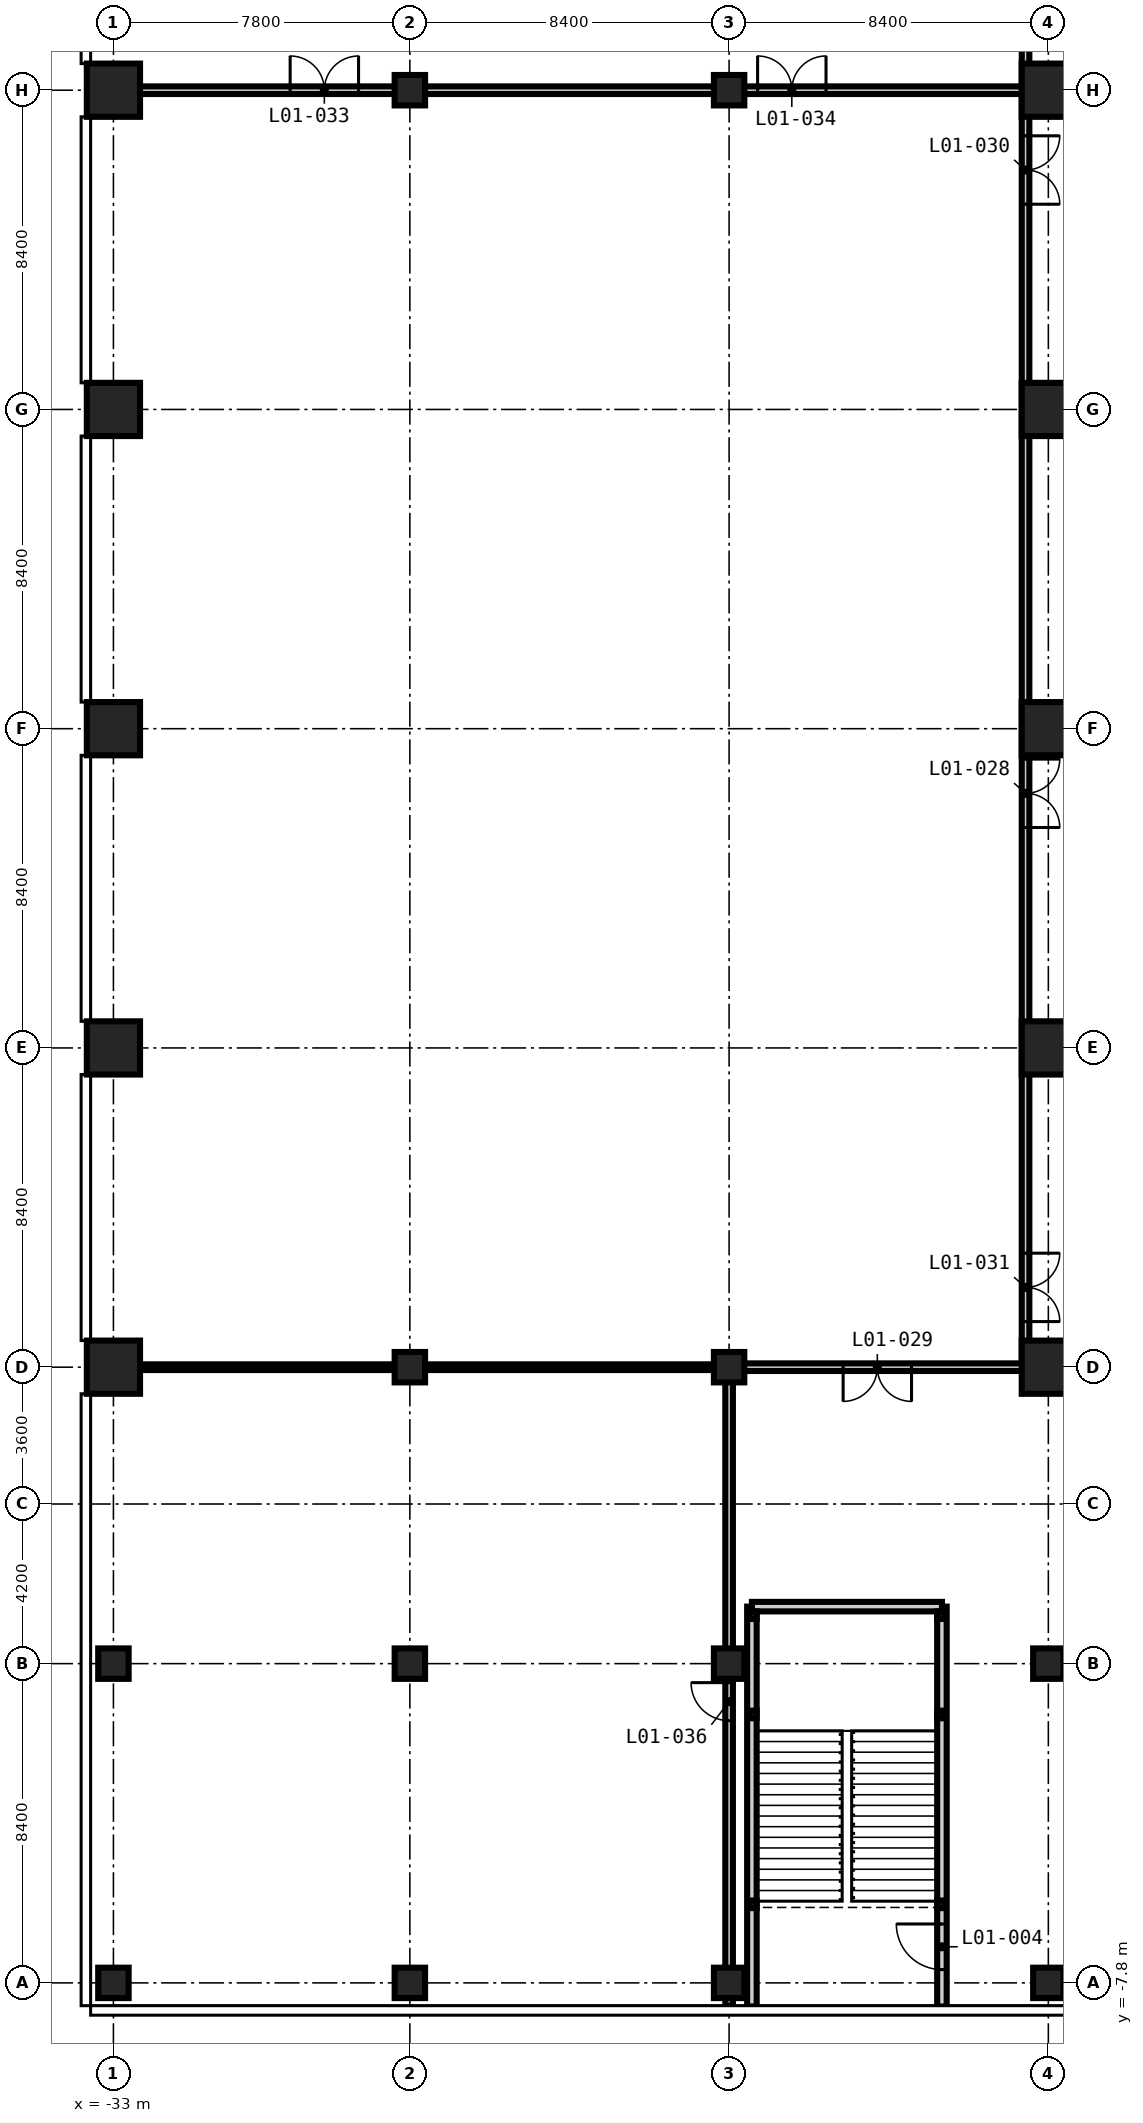
"""IFC4 building model, lengths in metres.
Left out: names, types, materials, properties, quantities, classifications, styles, units other than length and angle.
Written with IfcOpenShell. Run it as: python <this file> out.ifc"""

import sys

from ifc_helpers import new_model, si_unit, direction, frame, frame_2d, origin, origin_2d, place, context, subcontext, project, spatial, rectangle, hollow_rectangle, extrude, element, fill, save


model = new_model("IFC4")
c1 = context("Model", 3, precision=1e-05, world=origin(), true_north=direction((0.0, 1.0)))
c2 = subcontext(c1, "Body", "Model", "MODEL_VIEW")
j1 = project(units=[si_unit("LENGTHUNIT", "METRE"), si_unit("PLANEANGLEUNIT", "RADIAN")], contexts=[c1])
p1 = place(None, origin())
s1 = spatial("IfcSite", under=j1, at=p1, CompositionType="ELEMENT")
p2 = place(p1, origin())
s2 = spatial("IfcBuilding", under=s1, at=p2, CompositionType="ELEMENT")
p3 = place(p2, frame((0.0, 0.0, 6.0)))
s3 = spatial("IfcBuildingStorey", under=s2, at=p3, CompositionType="ELEMENT", Elevation=6.0)
for number, where, z_axis, x_axis in (
    (1, (-33.0, -7.8, -0.3), (0.0, 0.0, 1.0), (1.0, 0.0, 0.0)),
    (2, (-33.0, 0.6, -0.3), (0.0, 0.0, 1.0), (1.0, 0.0, 0.0)),
):
    element("IfcColumn", number, at=place(p3, frame(where, z_axis=z_axis, x_axis=x_axis)), inside=s3, PredefinedType="COLUMN", context=c2, shape_type="SweptSolid", body=[
        extrude(rectangle(XDim=0.8, YDim=0.8, at=origin_2d()), origin(), (0.0, 0.0, 1.0), 6.0),
    ])
for number, where, z_axis, x_axis in (
    (3, (-33.0, 8.4, -0.3), (0.0, 0.0, 1.0), (1.0, 0.0, 0.0)),
    (4, (-33.0, 16.8, -0.3), (0.0, 0.0, 1.0), (1.0, 0.0, 0.0)),
    (5, (-33.0, 25.2, -0.3), (0.0, 0.0, 1.0), (1.0, 0.0, 0.0)),
    (6, (-33.0, 33.6, -0.3), (0.0, 0.0, 1.0), (1.0, 0.0, 0.0)),
    (7, (-33.0, 42.0, -0.3), (0.0, 0.0, 1.0), (1.0, 0.0, 0.0)),
):
    element("IfcColumn", number, at=place(p3, frame(where, z_axis=z_axis, x_axis=x_axis)), inside=s3, PredefinedType="COLUMN", context=c2, shape_type="SweptSolid", body=[
        extrude(rectangle(XDim=1.4, YDim=1.4, at=origin_2d()), origin(), (0.0, 0.0, 1.0), 6.0),
    ])
for number, where, z_axis, x_axis in (
    (8, (-25.2, -7.8, -0.3), (0.0, 0.0, 1.0), (1.0, 0.0, 0.0)),
    (9, (-25.2, 0.6, -0.3), (0.0, 0.0, 1.0), (1.0, 0.0, 0.0)),
    (10, (-25.2, 8.4, -0.3), (0.0, 0.0, 1.0), (1.0, 0.0, 0.0)),
    (11, (-25.2, 42.0, -0.3), (0.0, 0.0, 1.0), (1.0, 0.0, 0.0)),
    (12, (-16.8, -7.8, -0.3), (0.0, 0.0, 1.0), (1.0, 0.0, 0.0)),
    (13, (-16.8, 0.6, -0.3), (0.0, 0.0, 1.0), (1.0, 0.0, 0.0)),
    (14, (-16.8, 8.4, -0.3), (0.0, 0.0, 1.0), (1.0, 0.0, 0.0)),
    (15, (-16.8, 42.0, -0.3), (0.0, 0.0, 1.0), (1.0, 0.0, 0.0)),
    (16, (-8.4, -7.8, -0.3), (0.0, 0.0, 1.0), (1.0, 0.0, 0.0)),
    (17, (-8.4, 0.6, -0.3), (0.0, 0.0, 1.0), (1.0, 0.0, 0.0)),
):
    element("IfcColumn", number, at=place(p3, frame(where, z_axis=z_axis, x_axis=x_axis)), inside=s3, PredefinedType="COLUMN", context=c2, shape_type="SweptSolid", body=[
        extrude(rectangle(XDim=0.8, YDim=0.8, at=origin_2d()), origin(), (0.0, 0.0, 1.0), 6.0),
    ])
for number, where, z_axis, x_axis in (
    (18, (-8.4, 8.4, -0.3), (0.0, 0.0, 1.0), (1.0, 0.0, 0.0)),
    (19, (-8.4, 16.8, -0.3), (0.0, 0.0, 1.0), (1.0, 0.0, 0.0)),
    (20, (-8.4, 25.2, -0.3), (0.0, 0.0, 1.0), (1.0, 0.0, 0.0)),
    (21, (-8.4, 33.6, -0.3), (0.0, 0.0, 1.0), (1.0, 0.0, 0.0)),
    (22, (-8.4, 42.0, -0.3), (0.0, 0.0, 1.0), (1.0, 0.0, 0.0)),
):
    element("IfcColumn", number, at=place(p3, frame(where, z_axis=z_axis, x_axis=x_axis)), inside=s3, PredefinedType="COLUMN", context=c2, shape_type="SweptSolid", body=[
        extrude(rectangle(XDim=1.4, YDim=1.4, at=origin_2d()), origin(), (0.0, 0.0, 1.0), 6.0),
    ])
p4 = place(p3, frame((-16.8, -8.4, 0.0), z_axis=(0.0, 0.0, 1.0), x_axis=(0.0, 1.0, 0.0)))
e23 = element("IfcWall", 23, at=p4, inside=s3, PredefinedType="PARTITIONING", context=c2, shape_type="SweptSolid", body=[
    extrude(rectangle(XDim=16.8, YDim=0.2, at=frame_2d((8.4, 0.0))), origin(), (0.0, 0.0, 1.0), 5.7),
])
p5 = place(p4, frame((7.5, 0.0, 0.0)))
e24 = element("IfcOpeningElement", 24, at=p5, cuts=e23, PredefinedType="OPENING", context=c2, shape_type="SweptSolid", body=[
    extrude(rectangle(XDim=1.0, YDim=2.1, at=frame_2d((0.5, 1.05))), frame((0.0, 0.11, 0.0), z_axis=(0.0, -1.0, 0.0), x_axis=(1.0, 0.0, 0.0)), (0.0, 0.0, 1.0), 0.22),
])
p6 = place(p3, frame((-9.0, 42.0, 0.0), z_axis=(0.0, 0.0, 1.0), x_axis=(0.0, 1.0, 0.0)))
e25 = element("IfcWall", 25, at=p6, inside=s3, PredefinedType="PARTITIONING", context=c2, shape_type="SweptSolid", body=[
    extrude(rectangle(XDim=2.4, YDim=0.2, at=frame_2d((1.2, 0.0))), origin(), (0.0, 0.0, 1.0), 5.7),
])
p7 = place(p3, frame((-33.6, 42.0, 0.0), z_axis=(0.0, 0.0, 1.0), x_axis=(1.0, 0.0, 0.0)))
e26 = element("IfcWall", 26, at=p7, inside=s3, PredefinedType="PARTITIONING", context=c2, shape_type="SweptSolid", body=[
    extrude(rectangle(XDim=24.6, YDim=0.2, at=frame_2d((12.3, 0.0))), origin(), (0.0, 0.0, 1.0), 5.7),
])
p8 = place(p7, frame((5.25, 0.0, 0.0)))
e27 = element("IfcOpeningElement", 27, at=p8, cuts=e26, PredefinedType="OPENING", context=c2, shape_type="SweptSolid", body=[
    extrude(rectangle(XDim=1.8, YDim=2.4, at=frame_2d((0.9, 1.2))), frame((0.0, 0.11, 0.0), z_axis=(0.0, -1.0, 0.0), x_axis=(1.0, 0.0, 0.0)), (0.0, 0.0, 1.0), 0.22),
])
p9 = place(p7, frame((17.55, 0.0, 0.0)))
e28 = element("IfcOpeningElement", 28, at=p9, cuts=e26, PredefinedType="OPENING", context=c2, shape_type="SweptSolid", body=[
    extrude(rectangle(XDim=1.8, YDim=2.4, at=frame_2d((0.9, 1.2))), frame((0.0, 0.11, 0.0), z_axis=(0.0, -1.0, 0.0), x_axis=(1.0, 0.0, 0.0)), (0.0, 0.0, 1.0), 0.22),
])
p10 = place(p3, frame((-9.0, 42.0, 0.0), z_axis=(0.0, 0.0, 1.0), x_axis=(0.0, -1.0, 0.0)))
e29 = element("IfcWall", 29, at=p10, inside=s3, PredefinedType="PARTITIONING", context=c2, shape_type="SweptSolid", body=[
    extrude(rectangle(XDim=33.6, YDim=0.2, at=frame_2d((16.8, 0.0))), origin(), (0.0, 0.0, 1.0), 5.7),
])
p11 = place(p10, frame((17.6, 0.0, 0.0)))
e30 = element("IfcOpeningElement", 30, at=p11, cuts=e29, PredefinedType="OPENING", context=c2, shape_type="SweptSolid", body=[
    extrude(rectangle(XDim=1.8, YDim=2.4, at=frame_2d((0.9, 1.2))), frame((0.0, 0.11, 0.0), z_axis=(0.0, -1.0, 0.0), x_axis=(1.0, 0.0, 0.0)), (0.0, 0.0, 1.0), 0.22),
])
p12 = place(p10, frame((1.2, 0.0, 0.0)))
e31 = element("IfcOpeningElement", 31, at=p12, cuts=e29, PredefinedType="OPENING", context=c2, shape_type="SweptSolid", body=[
    extrude(rectangle(XDim=1.8, YDim=2.4, at=frame_2d((0.9, 1.2))), frame((0.0, 0.11, 0.0), z_axis=(0.0, -1.0, 0.0), x_axis=(1.0, 0.0, 0.0)), (0.0, 0.0, 1.0), 0.22),
])
p13 = place(p10, frame((30.6, 0.0, 0.0)))
e32 = element("IfcOpeningElement", 32, at=p13, cuts=e29, PredefinedType="OPENING", context=c2, shape_type="SweptSolid", body=[
    extrude(rectangle(XDim=1.8, YDim=2.4, at=frame_2d((0.9, 1.2))), frame((0.0, 0.11, 0.0), z_axis=(0.0, -1.0, 0.0), x_axis=(1.0, 0.0, 0.0)), (0.0, 0.0, 1.0), 0.22),
])
p14 = place(p3, frame((-9.0, 8.4, 0.0), z_axis=(0.0, 0.0, 1.0), x_axis=(-1.0, 0.0, 0.0)))
e33 = element("IfcWall", 33, at=p14, inside=s3, PredefinedType="PARTITIONING", context=c2, shape_type="SweptSolid", body=[
    extrude(rectangle(XDim=7.8, YDim=0.2, at=frame_2d((3.9, 0.0))), origin(), (0.0, 0.0, 1.0), 5.7),
])
p15 = place(p14, frame((3.0, 0.0, 0.0)))
e34 = element("IfcOpeningElement", 34, at=p15, cuts=e33, PredefinedType="OPENING", context=c2, shape_type="SweptSolid", body=[
    extrude(rectangle(XDim=1.8, YDim=2.4, at=frame_2d((0.9, 1.2))), frame((0.0, 0.11, 0.0), z_axis=(0.0, -1.0, 0.0), x_axis=(1.0, 0.0, 0.0)), (0.0, 0.0, 1.0), 0.22),
])
p16 = place(p3, frame((-33.6, 8.4, 0.0), z_axis=(0.0, 0.0, 1.0), x_axis=(1.0, 0.0, 0.0)))
e35 = element("IfcWall", 35, at=p16, inside=s3, PredefinedType="PARTITIONING", context=c2, shape_type="SweptSolid", body=[
    extrude(rectangle(XDim=16.8, YDim=0.15, at=frame_2d((8.4, 0.0))), origin(), (0.0, 0.0, 1.0), 5.7),
])
p17 = place(p3, frame((-16.2, -8.423, 0.0), z_axis=(0.0, 0.0, 1.0), x_axis=(0.0, 1.0, 0.0)))
e36 = element("IfcWall", 36, at=p17, inside=s3, PredefinedType="PARTITIONING", context=c2, shape_type="SweptSolid", body=[
    extrude(rectangle(XDim=10.523, YDim=0.25, at=frame_2d((5.262, 0.0))), origin(), (0.0, 0.0, 1.0), 5.7),
])
p18 = place(p3, frame((-11.2, -8.423, 0.0), z_axis=(0.0, 0.0, 1.0), x_axis=(0.0, 1.0, 0.0)))
e37 = element("IfcWall", 37, at=p18, inside=s3, PredefinedType="PARTITIONING", context=c2, shape_type="SweptSolid", body=[
    extrude(rectangle(XDim=10.523, YDim=0.25, at=frame_2d((5.262, 0.0))), origin(), (0.0, 0.0, 1.0), 5.7),
])
p19 = place(p18, frame((0.973, 0.0, 0.0)))
e38 = element("IfcOpeningElement", 38, at=p19, cuts=e37, PredefinedType="OPENING", context=c2, shape_type="SweptSolid", body=[
    extrude(rectangle(XDim=1.2, YDim=2.2, at=frame_2d((0.6, 1.1))), frame((0.0, 0.135, 0.0), z_axis=(0.0, -1.0, 0.0), x_axis=(1.0, 0.0, 0.0)), (0.0, 0.0, 1.0), 0.27),
])
p20 = place(p3, frame((-16.2, 2.1, 0.0), z_axis=(0.0, 0.0, 1.0), x_axis=(1.0, 0.0, 0.0)))
e39 = element("IfcWall", 39, at=p20, inside=s3, PredefinedType="PARTITIONING", context=c2, shape_type="SweptSolid", body=[
    extrude(rectangle(XDim=5.0, YDim=0.25, at=frame_2d((2.5, 0.0))), origin(), (0.0, 0.0, 1.0), 5.7),
])
for number, where, z_axis, x_axis in (
    (40, (-16.175, -5.732, -0.3), (0.0, 0.0, 1.0), (1.0, 0.0, 0.0)),
    (41, (-11.225, -5.732, -0.3), (0.0, 0.0, 1.0), (1.0, 0.0, 0.0)),
    (42, (-16.175, -0.738, -0.3), (0.0, 0.0, 1.0), (1.0, 0.0, 0.0)),
    (43, (-11.225, -0.738, -0.3), (0.0, 0.0, 1.0), (1.0, 0.0, 0.0)),
    (44, (-16.175, 1.875, -0.3), (0.0, 0.0, 1.0), (1.0, 0.0, 0.0)),
    (45, (-11.225, 1.875, -0.3), (0.0, 0.0, 1.0), (1.0, 0.0, 0.0)),
):
    element("IfcColumn", number, at=place(p3, frame(where, z_axis=z_axis, x_axis=x_axis)), inside=s3, PredefinedType="COLUMN", context=c2, shape_type="SweptSolid", body=[
        extrude(hollow_rectangle(XDim=0.2, YDim=0.2, WallThickness=0.01, at=origin_2d()), origin(), (0.0, 0.0, 1.0), 6.0),
    ])
p21 = place(p19, origin())
e46 = element("IfcDoor", 46, at=p21, inside=s3, OperationType="SINGLE_SWING_RIGHT", PredefinedType="DOOR", context=c2, shape_type="SweptSolid", body=[
    extrude(rectangle(XDim=1.2, YDim=2.2, at=frame_2d((0.6, 1.1))), frame((0.0, 0.025, 0.0), z_axis=(0.0, -1.0, 0.0), x_axis=(1.0, 0.0, 0.0)), (0.0, 0.0, 1.0), 0.05),
])
fill(e38, e46)
p22 = place(p11, origin())
e47 = element("IfcDoor", 47, at=p22, inside=s3, OperationType="DOUBLE_DOOR_DOUBLE_SWING", PredefinedType="DOOR", context=c2, shape_type="SweptSolid", body=[
    extrude(rectangle(XDim=1.8, YDim=2.4, at=frame_2d((0.9, 1.2))), frame((0.0, 0.025, 0.0), z_axis=(0.0, -1.0, 0.0), x_axis=(1.0, 0.0, 0.0)), (0.0, 0.0, 1.0), 0.05),
])
fill(e30, e47)
p23 = place(p15, origin())
e48 = element("IfcDoor", 48, at=p23, inside=s3, OperationType="DOUBLE_DOOR_DOUBLE_SWING", PredefinedType="DOOR", context=c2, shape_type="SweptSolid", body=[
    extrude(rectangle(XDim=1.8, YDim=2.4, at=frame_2d((0.9, 1.2))), frame((0.0, 0.025, 0.0), z_axis=(0.0, -1.0, 0.0), x_axis=(1.0, 0.0, 0.0)), (0.0, 0.0, 1.0), 0.05),
])
fill(e34, e48)
p24 = place(p12, origin())
e49 = element("IfcDoor", 49, at=p24, inside=s3, OperationType="DOUBLE_DOOR_DOUBLE_SWING", PredefinedType="DOOR", context=c2, shape_type="SweptSolid", body=[
    extrude(rectangle(XDim=1.8, YDim=2.4, at=frame_2d((0.9, 1.2))), frame((0.0, 0.025, 0.0), z_axis=(0.0, -1.0, 0.0), x_axis=(1.0, 0.0, 0.0)), (0.0, 0.0, 1.0), 0.05),
])
fill(e31, e49)
p25 = place(p13, origin())
e50 = element("IfcDoor", 50, at=p25, inside=s3, OperationType="DOUBLE_DOOR_DOUBLE_SWING", PredefinedType="DOOR", context=c2, shape_type="SweptSolid", body=[
    extrude(rectangle(XDim=1.8, YDim=2.4, at=frame_2d((0.9, 1.2))), frame((0.0, 0.025, 0.0), z_axis=(0.0, -1.0, 0.0), x_axis=(1.0, 0.0, 0.0)), (0.0, 0.0, 1.0), 0.05),
])
fill(e32, e50)
p26 = place(p8, origin())
e51 = element("IfcDoor", 51, at=p26, inside=s3, OperationType="DOUBLE_DOOR_DOUBLE_SWING", PredefinedType="DOOR", context=c2, shape_type="SweptSolid", body=[
    extrude(rectangle(XDim=1.8, YDim=2.4, at=frame_2d((0.9, 1.2))), frame((0.0, 0.025, 0.0), z_axis=(0.0, -1.0, 0.0), x_axis=(1.0, 0.0, 0.0)), (0.0, 0.0, 1.0), 0.05),
])
fill(e27, e51)
p27 = place(p9, origin())
e52 = element("IfcDoor", 52, at=p27, inside=s3, OperationType="DOUBLE_DOOR_DOUBLE_SWING", PredefinedType="DOOR", context=c2, shape_type="SweptSolid", body=[
    extrude(rectangle(XDim=1.8, YDim=2.4, at=frame_2d((0.9, 1.2))), frame((0.0, 0.025, 0.0), z_axis=(0.0, -1.0, 0.0), x_axis=(1.0, 0.0, 0.0)), (0.0, 0.0, 1.0), 0.05),
])
fill(e28, e52)
p28 = place(p5, origin())
e53 = element("IfcDoor", 53, at=p28, inside=s3, OperationType="SINGLE_SWING_RIGHT", PredefinedType="DOOR", context=c2, shape_type="SweptSolid", body=[
    extrude(rectangle(XDim=1.0, YDim=2.1, at=frame_2d((0.5, 1.05))), frame((0.0, 0.025, 0.0), z_axis=(0.0, -1.0, 0.0), x_axis=(1.0, 0.0, 0.0)), (0.0, 0.0, 1.0), 0.05),
])
fill(e24, e53)
save(model, sys.argv[1])
